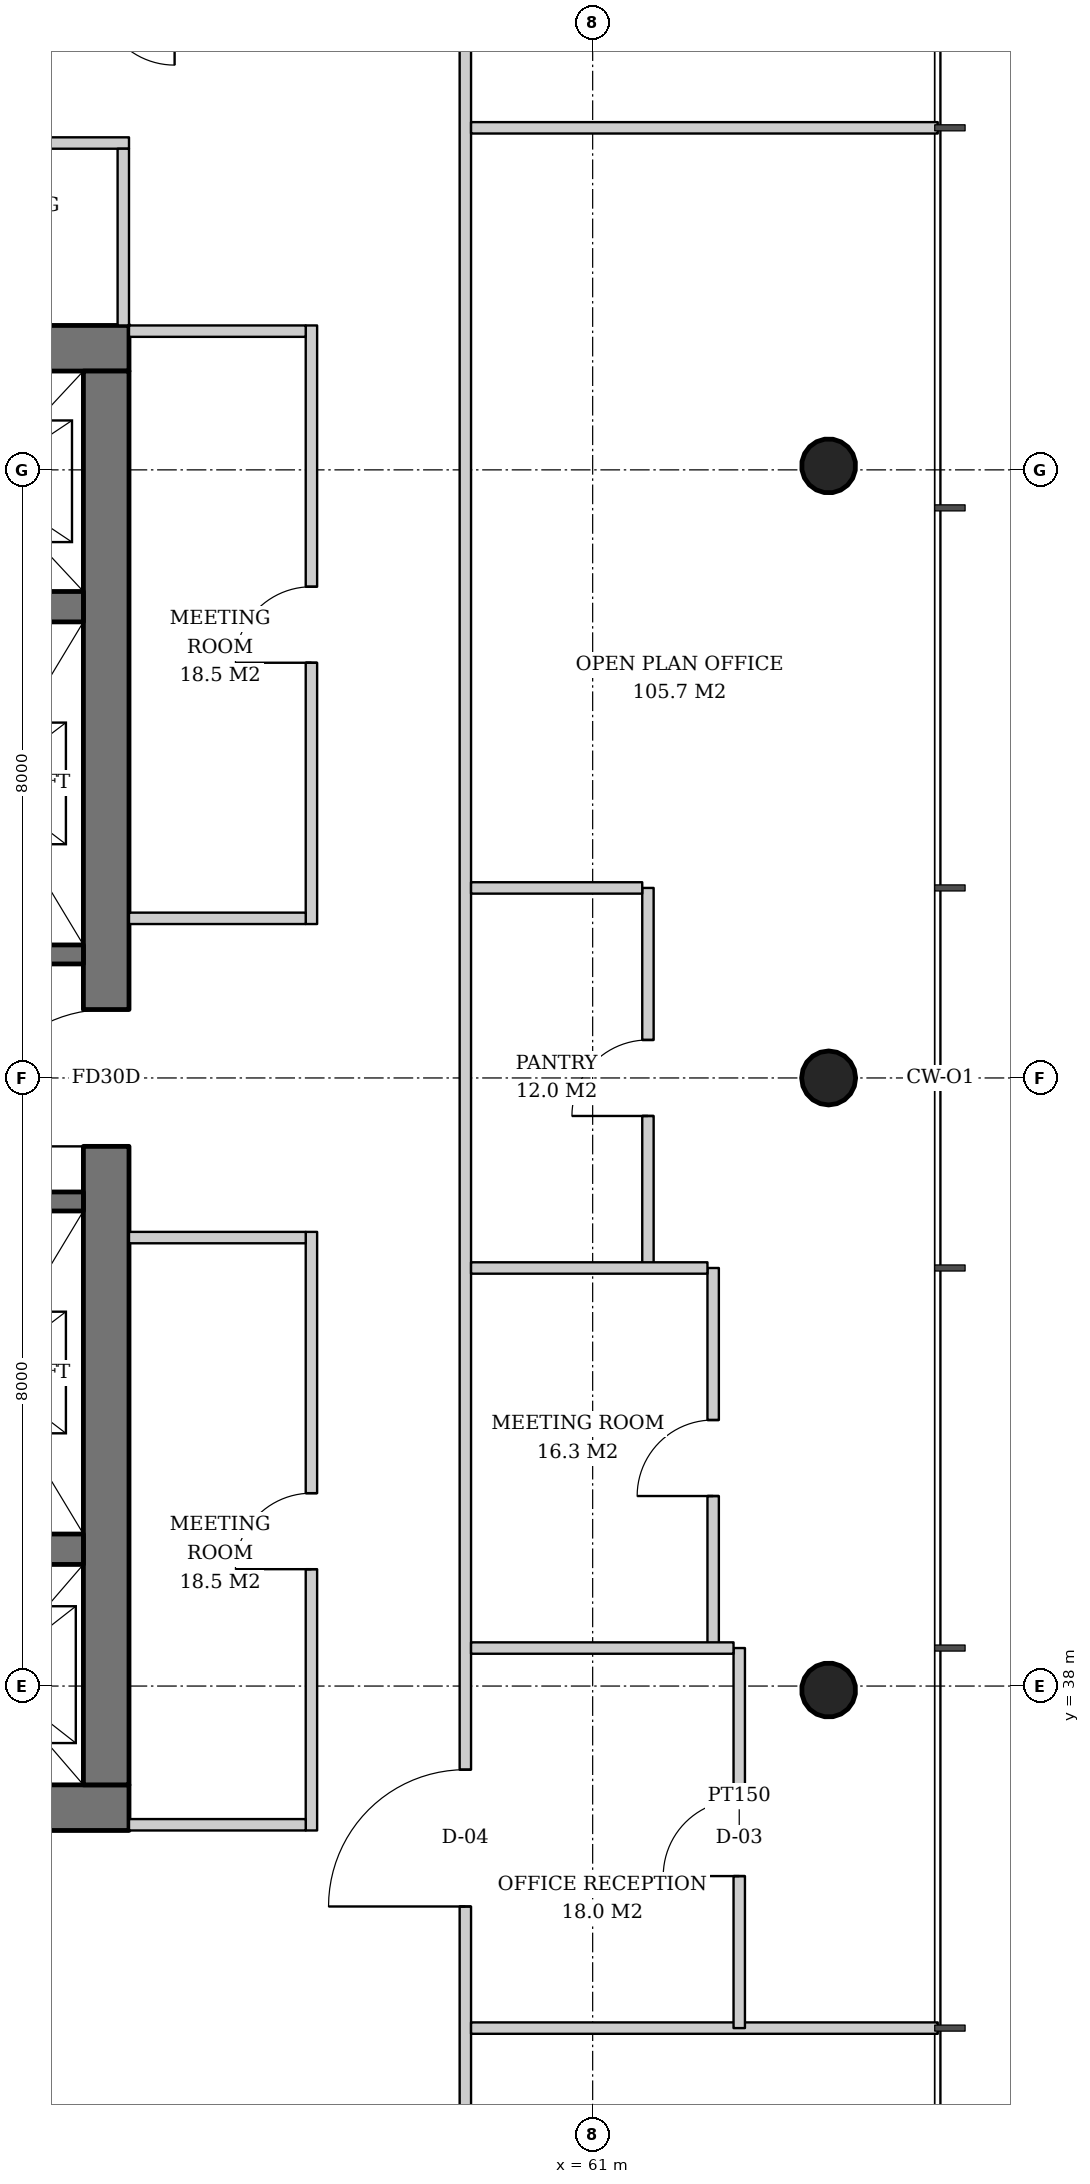
"""IFC4 building model, lengths in metres.
Left out: names, types, materials, properties, quantities, classifications, styles, units other than length and angle.
Written with IfcOpenShell. Run it as: python <this file> out.ifc"""

import sys

from ifc_helpers import new_model, si_unit, direction, frame, frame_2d, origin, origin_2d, place, context, subcontext, project, spatial, rectangle, hollow_circle, extrude, element, fill, save


model = new_model("IFC4")
c1 = context("Model", 3, precision=1e-05, world=origin(), true_north=direction((0.0, 1.0)))
c2 = subcontext(c1, "Body", "Model", "MODEL_VIEW")
j1 = project(units=[si_unit("LENGTHUNIT", "METRE"), si_unit("PLANEANGLEUNIT", "RADIAN")], contexts=[c1])
p1 = place(None, origin())
s1 = spatial("IfcSite", under=j1, at=p1, CompositionType="ELEMENT")
p2 = place(p1, origin())
s2 = spatial("IfcBuilding", under=s1, at=p2, CompositionType="ELEMENT")
p3 = place(p2, frame((0.0, 0.0, 173.0)))
s3 = spatial("IfcBuildingStorey", under=s2, at=p3, CompositionType="ELEMENT", Elevation=173.0)
p4 = place(p3, frame((64.143, 37.928, 0.0), z_axis=(-0.031910269556, 0.015987237665, 0.999362868496), x_axis=(-0.447933021895, -0.894067115991, 0.0)))
e1 = element("IfcColumn", 1, at=p4, inside=s3, PredefinedType="COLUMN", context=c2, shape_type="SweptSolid", body=[
    extrude(hollow_circle(Radius=0.355, WallThickness=0.025, at=origin_2d()), origin(), (0.0, 0.0, 1.0), 3.802),
])
p5 = place(p3, frame((64.143, 46.0, 0.0), z_axis=(-0.031914348339, 0.0, 0.999490607445), x_axis=(0.0, -1.0, 0.0)))
e2 = element("IfcColumn", 2, at=p5, inside=s3, PredefinedType="COLUMN", context=c2, shape_type="SweptSolid", body=[
    extrude(hollow_circle(Radius=0.355, WallThickness=0.025, at=origin_2d()), origin(), (0.0, 0.0, 1.0), 3.802),
])
p6 = place(p3, frame((64.143, 54.072, 0.0), z_axis=(-0.031910269556, -0.015987237665, 0.999362868496), x_axis=(0.447933021895, -0.894067115991, 0.0)))
e3 = element("IfcColumn", 3, at=p6, inside=s3, PredefinedType="COLUMN", context=c2, shape_type="SweptSolid", body=[
    extrude(hollow_circle(Radius=0.355, WallThickness=0.025, at=origin_2d()), origin(), (0.0, 0.0, 1.0), 3.802),
])
p7 = place(p3, frame((35.1, 36.4, 0.0), z_axis=(0.0, 0.0, 1.0), x_axis=(1.0, 0.0, 0.0)))
e4 = element("IfcWall", 4, at=p7, inside=s3, PredefinedType="SHEAR", context=c2, shape_type="SweptSolid", body=[
    extrude(rectangle(XDim=19.8, YDim=0.6, at=frame_2d((9.9, 0.0))), origin(), (0.0, 0.0, 1.0), 3.8),
])
p8 = place(p7, frame((3.9, 0.0, 0.0)))
e5 = element("IfcOpeningElement", 5, at=p8, cuts=e4, PredefinedType="OPENING", context=c2, shape_type="SweptSolid", body=[
    extrude(rectangle(XDim=1.0, YDim=2.1, at=frame_2d((0.5, 1.05))), frame((0.0, 0.31, 0.0), z_axis=(0.0, -1.0, 0.0), x_axis=(1.0, 0.0, 0.0)), (0.0, 0.0, 1.0), 0.62),
])
p9 = place(p7, frame((15.35, 0.0, 0.0)))
e6 = element("IfcOpeningElement", 6, at=p9, cuts=e4, PredefinedType="OPENING", context=c2, shape_type="SweptSolid", body=[
    extrude(rectangle(XDim=1.0, YDim=2.1, at=frame_2d((0.5, 1.05))), frame((0.0, 0.31, 0.0), z_axis=(0.0, -1.0, 0.0), x_axis=(1.0, 0.0, 0.0)), (0.0, 0.0, 1.0), 0.62),
])
p10 = place(p3, frame((35.1, 55.6, 0.0), z_axis=(0.0, 0.0, 1.0), x_axis=(1.0, 0.0, 0.0)))
e7 = element("IfcWall", 7, at=p10, inside=s3, PredefinedType="SHEAR", context=c2, shape_type="SweptSolid", body=[
    extrude(rectangle(XDim=19.8, YDim=0.6, at=frame_2d((9.9, 0.0))), origin(), (0.0, 0.0, 1.0), 3.8),
])
p11 = place(p10, frame((14.54, 0.0, 0.0)))
e8 = element("IfcOpeningElement", 8, at=p11, cuts=e7, PredefinedType="OPENING", context=c2, shape_type="SweptSolid", body=[
    extrude(rectangle(XDim=1.0, YDim=2.1, at=frame_2d((0.5, 1.05))), frame((0.0, 0.31, 0.0), z_axis=(0.0, -1.0, 0.0), x_axis=(1.0, 0.0, 0.0)), (0.0, 0.0, 1.0), 0.62),
])
p12 = place(p10, frame((0.931, 0.0, 0.0)))
e9 = element("IfcOpeningElement", 9, at=p12, cuts=e7, PredefinedType="OPENING", context=c2, shape_type="SweptSolid", body=[
    extrude(rectangle(XDim=1.0, YDim=2.1, at=frame_2d((0.5, 1.05))), frame((0.0, 0.31, 0.0), z_axis=(0.0, -1.0, 0.0), x_axis=(1.0, 0.0, 0.0)), (0.0, 0.0, 1.0), 0.62),
])
p13 = place(p10, frame((2.448, 0.0, 0.0)))
e10 = element("IfcOpeningElement", 10, at=p13, cuts=e7, PredefinedType="OPENING", context=c2, shape_type="SweptSolid", body=[
    extrude(rectangle(XDim=1.0, YDim=2.1, at=frame_2d((0.5, 1.05))), frame((0.0, 0.31, 0.0), z_axis=(0.0, -1.0, 0.0), x_axis=(1.0, 0.0, 0.0)), (0.0, 0.0, 1.0), 0.62),
])
p14 = place(p10, frame((3.983, 0.0, 0.0)))
e11 = element("IfcOpeningElement", 11, at=p14, cuts=e7, PredefinedType="OPENING", context=c2, shape_type="SweptSolid", body=[
    extrude(rectangle(XDim=1.0, YDim=2.1, at=frame_2d((0.5, 1.05))), frame((0.0, 0.31, 0.0), z_axis=(0.0, -1.0, 0.0), x_axis=(1.0, 0.0, 0.0)), (0.0, 0.0, 1.0), 0.62),
])
p15 = place(p3, frame((54.6, 36.7, 0.0), z_axis=(0.0, 0.0, 1.0), x_axis=(0.0, 1.0, 0.0)))
e12 = element("IfcWall", 12, at=p15, inside=s3, PredefinedType="SHEAR", context=c2, shape_type="SweptSolid", body=[
    extrude(rectangle(XDim=18.6, YDim=0.6, at=frame_2d((9.3, 0.0))), origin(), (0.0, 0.0, 1.0), 3.8),
])
p16 = place(p15, frame((8.4, 0.0, 0.0)))
e13 = element("IfcOpeningElement", 13, at=p16, cuts=e12, PredefinedType="OPENING", context=c2, shape_type="SweptSolid", body=[
    extrude(rectangle(XDim=1.8, YDim=2.4, at=frame_2d((0.9, 1.2))), frame((0.0, 0.31, 0.0), z_axis=(0.0, -1.0, 0.0), x_axis=(1.0, 0.0, 0.0)), (0.0, 0.0, 1.0), 0.62),
])
for number, where, z_axis, x_axis in (
    (14, (35.7, 39.8, 0.0), (0.0, 0.0, 1.0), (1.0, 0.0, 0.0)),
    (15, (35.7, 52.2, 0.0), (0.0, 0.0, 1.0), (1.0, 0.0, 0.0)),
):
    element("IfcWall", number, at=place(p3, frame(where, z_axis=z_axis, x_axis=x_axis)), inside=s3, PredefinedType="SHEAR", context=c2, shape_type="SweptSolid", body=[
        extrude(rectangle(XDim=18.6, YDim=0.4, at=frame_2d((9.3, 0.0))), origin(), (0.0, 0.0, 1.0), 3.8),
    ])
for number, where, z_axis, x_axis in (
    (16, (48.93, 47.625, 0.0), (0.0, 0.0, 1.0), (1.0, 0.0, 0.0)),
    (17, (48.93, 44.375, 0.0), (0.0, 0.0, 1.0), (1.0, 0.0, 0.0)),
):
    element("IfcWall", number, at=place(p3, frame(where, z_axis=z_axis, x_axis=x_axis)), inside=s3, PredefinedType="SHEAR", context=c2, shape_type="SweptSolid", body=[
        extrude(rectangle(XDim=5.37, YDim=0.25, at=frame_2d((2.685, 0.0))), origin(), (0.0, 0.0, 1.0), 3.8),
    ])
p17 = place(p3, frame((57.3, 36.1, 0.0), z_axis=(0.0, 0.0, 1.0), x_axis=(0.0, 1.0, 0.0)))
e18 = element("IfcWall", 18, at=p17, inside=s3, PredefinedType="PARTITIONING", context=c2, shape_type="SweptSolid", body=[
    extrude(rectangle(XDim=7.875, YDim=0.15, at=frame_2d((3.938, 0.0))), origin(), (0.0, 0.0, 1.0), 2.867),
])
p18 = place(p17, frame((3.438, 0.0, 0.0)))
e19 = element("IfcOpeningElement", 19, at=p18, cuts=e18, PredefinedType="OPENING", context=c2, shape_type="SweptSolid", body=[
    extrude(rectangle(XDim=1.0, YDim=2.1, at=frame_2d((0.5, 1.05))), frame((0.0, 0.085, 0.0), z_axis=(0.0, -1.0, 0.0), x_axis=(1.0, 0.0, 0.0)), (0.0, 0.0, 1.0), 0.17),
])
p19 = place(p3, frame((54.9, 36.175, 0.0), z_axis=(0.0, 0.0, 1.0), x_axis=(1.0, 0.0, 0.0)))
e20 = element("IfcWall", 20, at=p19, inside=s3, PredefinedType="PARTITIONING", context=c2, shape_type="SweptSolid", body=[
    extrude(rectangle(XDim=2.325, YDim=0.15, at=frame_2d((1.163, 0.0))), origin(), (0.0, 0.0, 1.0), 2.867),
])
p20 = place(p3, frame((54.9, 43.9, 0.0), z_axis=(0.0, 0.0, 1.0), x_axis=(1.0, 0.0, 0.0)))
e21 = element("IfcWall", 21, at=p20, inside=s3, PredefinedType="PARTITIONING", context=c2, shape_type="SweptSolid", body=[
    extrude(rectangle(XDim=2.325, YDim=0.15, at=frame_2d((1.163, 0.0))), origin(), (0.0, 0.0, 1.0), 3.62),
])
p21 = place(p3, frame((57.3, 48.025, 0.0), z_axis=(0.0, 0.0, 1.0), x_axis=(0.0, 1.0, 0.0)))
e22 = element("IfcWall", 22, at=p21, inside=s3, PredefinedType="PARTITIONING", context=c2, shape_type="SweptSolid", body=[
    extrude(rectangle(XDim=7.875, YDim=0.15, at=frame_2d((3.938, 0.0))), origin(), (0.0, 0.0, 1.0), 2.867),
])
p22 = place(p21, frame((3.438, 0.0, 0.0)))
e23 = element("IfcOpeningElement", 23, at=p22, cuts=e22, PredefinedType="OPENING", context=c2, shape_type="SweptSolid", body=[
    extrude(rectangle(XDim=1.0, YDim=2.1, at=frame_2d((0.5, 1.05))), frame((0.0, 0.085, 0.0), z_axis=(0.0, -1.0, 0.0), x_axis=(1.0, 0.0, 0.0)), (0.0, 0.0, 1.0), 0.17),
])
for number, where, z_axis, x_axis in (
    (24, (54.9, 48.1, 0.0), (0.0, 0.0, 1.0), (1.0, 0.0, 0.0)),
    (25, (54.9, 55.825, 0.0), (0.0, 0.0, 1.0), (1.0, 0.0, 0.0)),
):
    element("IfcWall", number, at=place(p3, frame(where, z_axis=z_axis, x_axis=x_axis)), inside=s3, PredefinedType="PARTITIONING", context=c2, shape_type="SweptSolid", body=[
        extrude(rectangle(XDim=2.325, YDim=0.15, at=frame_2d((1.163, 0.0))), origin(), (0.0, 0.0, 1.0), 3.62),
    ])
p23 = place(p3, frame((54.9, 58.3, 0.0), z_axis=(0.0, 0.0, 1.0), x_axis=(-1.0, 0.0, 0.0)))
e26 = element("IfcWall", 26, at=p23, inside=s3, PredefinedType="PARTITIONING", context=c2, shape_type="SweptSolid", body=[
    extrude(rectangle(XDim=3.135, YDim=0.15, at=frame_2d((1.567, 0.0))), origin(), (0.0, 0.0, 1.0), 2.92),
])
p24 = place(p23, frame((1.067, 0.0, 0.0)))
e27 = element("IfcOpeningElement", 27, at=p24, cuts=e26, PredefinedType="OPENING", context=c2, shape_type="SweptSolid", body=[
    extrude(rectangle(XDim=1.0, YDim=2.1, at=frame_2d((0.5, 1.05))), frame((0.0, 0.085, 0.0), z_axis=(0.0, -1.0, 0.0), x_axis=(1.0, 0.0, 0.0)), (0.0, 0.0, 1.0), 0.17),
])
p25 = place(p3, frame((54.825, 55.9, 0.0), z_axis=(0.0, 0.0, 1.0), x_axis=(0.0, 1.0, 0.0)))
e28 = element("IfcWall", 28, at=p25, inside=s3, PredefinedType="PARTITIONING", context=c2, shape_type="SweptSolid", body=[
    extrude(rectangle(XDim=2.325, YDim=0.15, at=frame_2d((1.163, 0.0))), origin(), (0.0, 0.0, 1.0), 2.867),
])
p26 = place(p3, frame((59.325, 31.971, 0.0), z_axis=(0.0, 0.0, 1.0), x_axis=(0.0, 1.0, 0.0)))
e29 = element("IfcWall", 29, at=p26, inside=s3, PredefinedType="PARTITIONING", context=c2, shape_type="SweptSolid", body=[
    extrude(rectangle(XDim=28.057, YDim=0.15, at=frame_2d((14.029, 0.0))), origin(), (0.0, 0.0, 1.0), 2.867),
])
p27 = place(p26, frame((3.129, 0.0, 0.0)))
e30 = element("IfcOpeningElement", 30, at=p27, cuts=e29, PredefinedType="OPENING", context=c2, shape_type="SweptSolid", body=[
    extrude(rectangle(XDim=1.8, YDim=2.4, at=frame_2d((0.9, 1.2))), frame((0.0, 0.085, 0.0), z_axis=(0.0, -1.0, 0.0), x_axis=(1.0, 0.0, 0.0)), (0.0, 0.0, 1.0), 0.17),
])
for number, where, z_axis, x_axis in (
    (31, (59.4, 33.5, 0.0), (0.0, 0.0, 1.0), (1.0, 0.0, 0.0)),
    (32, (59.4, 58.5, 0.0), (0.0, 0.0, 1.0), (1.0, 0.0, 0.0)),
):
    element("IfcWall", number, at=place(p3, frame(where, z_axis=z_axis, x_axis=x_axis)), inside=s3, PredefinedType="PARTITIONING", context=c2, shape_type="SweptSolid", body=[
        extrude(rectangle(XDim=6.14, YDim=0.15, at=frame_2d((3.07, 0.0))), origin(), (0.0, 0.0, 1.0), 3.12),
    ])
p28 = place(p3, frame((62.928, 33.5, 0.0), z_axis=(0.0, 0.0, 1.0), x_axis=(0.0, 1.0, 0.0)))
e33 = element("IfcWall", 33, at=p28, inside=s3, PredefinedType="PARTITIONING", context=c2, shape_type="SweptSolid", body=[
    extrude(rectangle(XDim=5.0, YDim=0.15, at=frame_2d((2.5, 0.0))), origin(), (0.0, 0.0, 1.0), 2.92),
])
p29 = place(p28, frame((2.0, 0.0, 0.0)))
e34 = element("IfcOpeningElement", 34, at=p29, cuts=e33, PredefinedType="OPENING", context=c2, shape_type="SweptSolid", body=[
    extrude(rectangle(XDim=1.0, YDim=2.1, at=frame_2d((0.5, 1.05))), frame((0.0, 0.085, 0.0), z_axis=(0.0, -1.0, 0.0), x_axis=(1.0, 0.0, 0.0)), (0.0, 0.0, 1.0), 0.17),
])
p30 = place(p3, frame((62.585, 38.5, 0.0), z_axis=(0.0, 0.0, 1.0), x_axis=(0.0, 1.0, 0.0)))
e35 = element("IfcWall", 35, at=p30, inside=s3, PredefinedType="PARTITIONING", context=c2, shape_type="SweptSolid", body=[
    extrude(rectangle(XDim=5.0, YDim=0.15, at=frame_2d((2.5, 0.0))), origin(), (0.0, 0.0, 1.0), 2.867),
])
p31 = place(p30, frame((2.0, 0.0, 0.0)))
e36 = element("IfcOpeningElement", 36, at=p31, cuts=e35, PredefinedType="OPENING", context=c2, shape_type="SweptSolid", body=[
    extrude(rectangle(XDim=1.0, YDim=2.1, at=frame_2d((0.5, 1.05))), frame((0.0, 0.085, 0.0), z_axis=(0.0, -1.0, 0.0), x_axis=(1.0, 0.0, 0.0)), (0.0, 0.0, 1.0), 0.17),
])
p32 = place(p3, frame((61.727, 43.5, 0.0), z_axis=(0.0, 0.0, 1.0), x_axis=(0.0, 1.0, 0.0)))
e37 = element("IfcWall", 37, at=p32, inside=s3, PredefinedType="PARTITIONING", context=c2, shape_type="SweptSolid", body=[
    extrude(rectangle(XDim=5.0, YDim=0.15, at=frame_2d((2.5, 0.0))), origin(), (0.0, 0.0, 1.0), 2.867),
])
p33 = place(p32, frame((2.0, 0.0, 0.0)))
e38 = element("IfcOpeningElement", 38, at=p33, cuts=e37, PredefinedType="OPENING", context=c2, shape_type="SweptSolid", body=[
    extrude(rectangle(XDim=1.0, YDim=2.1, at=frame_2d((0.5, 1.05))), frame((0.0, 0.085, 0.0), z_axis=(0.0, -1.0, 0.0), x_axis=(1.0, 0.0, 0.0)), (0.0, 0.0, 1.0), 0.17),
])
p34 = place(p3, frame((59.4, 38.5, 0.0), z_axis=(0.0, 0.0, 1.0), x_axis=(1.0, 0.0, 0.0)))
e39 = element("IfcWall", 39, at=p34, inside=s3, PredefinedType="PARTITIONING", context=c2, shape_type="SweptSolid", body=[
    extrude(rectangle(XDim=3.454, YDim=0.15, at=frame_2d((1.727, 0.0))), origin(), (0.0, 0.0, 1.0), 3.62),
])
p35 = place(p3, frame((59.4, 43.5, 0.0), z_axis=(0.0, 0.0, 1.0), x_axis=(1.0, 0.0, 0.0)))
e40 = element("IfcWall", 40, at=p35, inside=s3, PredefinedType="PARTITIONING", context=c2, shape_type="SweptSolid", body=[
    extrude(rectangle(XDim=3.11, YDim=0.15, at=frame_2d((1.555, 0.0))), origin(), (0.0, 0.0, 1.0), 3.62),
])
p36 = place(p3, frame((59.4, 48.5, 0.0), z_axis=(0.0, 0.0, 1.0), x_axis=(1.0, 0.0, 0.0)))
e41 = element("IfcWall", 41, at=p36, inside=s3, PredefinedType="PARTITIONING", context=c2, shape_type="SweptSolid", body=[
    extrude(rectangle(XDim=2.252, YDim=0.15, at=frame_2d((1.126, 0.0))), origin(), (0.0, 0.0, 1.0), 2.867),
])
p37 = place(p16, origin())
e42 = element("IfcDoor", 42, at=p37, inside=s3, OperationType="DOUBLE_DOOR_SINGLE_SWING", PredefinedType="DOOR", context=c2, shape_type="SweptSolid", body=[
    extrude(rectangle(XDim=1.8, YDim=2.4, at=frame_2d((0.9, 1.2))), frame((0.0, 0.025, 0.0), z_axis=(0.0, -1.0, 0.0), x_axis=(1.0, 0.0, 0.0)), (0.0, 0.0, 1.0), 0.05),
])
fill(e13, e42)
p38 = place(p18, origin())
e43 = element("IfcDoor", 43, at=p38, inside=s3, OperationType="SINGLE_SWING_LEFT", PredefinedType="DOOR", context=c2, shape_type="SweptSolid", body=[
    extrude(rectangle(XDim=1.0, YDim=2.1, at=frame_2d((0.5, 1.05))), frame((0.0, 0.025, 0.0), z_axis=(0.0, -1.0, 0.0), x_axis=(1.0, 0.0, 0.0)), (0.0, 0.0, 1.0), 0.05),
])
fill(e19, e43)
p39 = place(p22, origin())
e44 = element("IfcDoor", 44, at=p39, inside=s3, OperationType="SINGLE_SWING_LEFT", PredefinedType="DOOR", context=c2, shape_type="SweptSolid", body=[
    extrude(rectangle(XDim=1.0, YDim=2.1, at=frame_2d((0.5, 1.05))), frame((0.0, 0.025, 0.0), z_axis=(0.0, -1.0, 0.0), x_axis=(1.0, 0.0, 0.0)), (0.0, 0.0, 1.0), 0.05),
])
fill(e23, e44)
p40 = place(p27, origin())
e45 = element("IfcDoor", 45, at=p40, inside=s3, OperationType="DOUBLE_DOOR_SINGLE_SWING", PredefinedType="DOOR", context=c2, shape_type="SweptSolid", body=[
    extrude(rectangle(XDim=1.8, YDim=2.4, at=frame_2d((0.9, 1.2))), frame((0.0, 0.025, 0.0), z_axis=(0.0, -1.0, 0.0), x_axis=(1.0, 0.0, 0.0)), (0.0, 0.0, 1.0), 0.05),
])
fill(e30, e45)
p41 = place(p29, origin())
e46 = element("IfcDoor", 46, at=p41, inside=s3, OperationType="SINGLE_SWING_LEFT", PredefinedType="DOOR", context=c2, shape_type="SweptSolid", body=[
    extrude(rectangle(XDim=1.0, YDim=2.1, at=frame_2d((0.5, 1.05))), frame((0.0, 0.025, 0.0), z_axis=(0.0, -1.0, 0.0), x_axis=(1.0, 0.0, 0.0)), (0.0, 0.0, 1.0), 0.05),
])
fill(e34, e46)
p42 = place(p31, origin())
e47 = element("IfcDoor", 47, at=p42, inside=s3, OperationType="SINGLE_SWING_LEFT", PredefinedType="DOOR", context=c2, shape_type="SweptSolid", body=[
    extrude(rectangle(XDim=1.0, YDim=2.1, at=frame_2d((0.5, 1.05))), frame((0.0, 0.025, 0.0), z_axis=(0.0, -1.0, 0.0), x_axis=(1.0, 0.0, 0.0)), (0.0, 0.0, 1.0), 0.05),
])
fill(e36, e47)
p43 = place(p33, origin())
e48 = element("IfcDoor", 48, at=p43, inside=s3, OperationType="SINGLE_SWING_LEFT", PredefinedType="DOOR", context=c2, shape_type="SweptSolid", body=[
    extrude(rectangle(XDim=1.0, YDim=2.1, at=frame_2d((0.5, 1.05))), frame((0.0, 0.025, 0.0), z_axis=(0.0, -1.0, 0.0), x_axis=(1.0, 0.0, 0.0)), (0.0, 0.0, 1.0), 0.05),
])
fill(e38, e48)
save(model, sys.argv[1])
